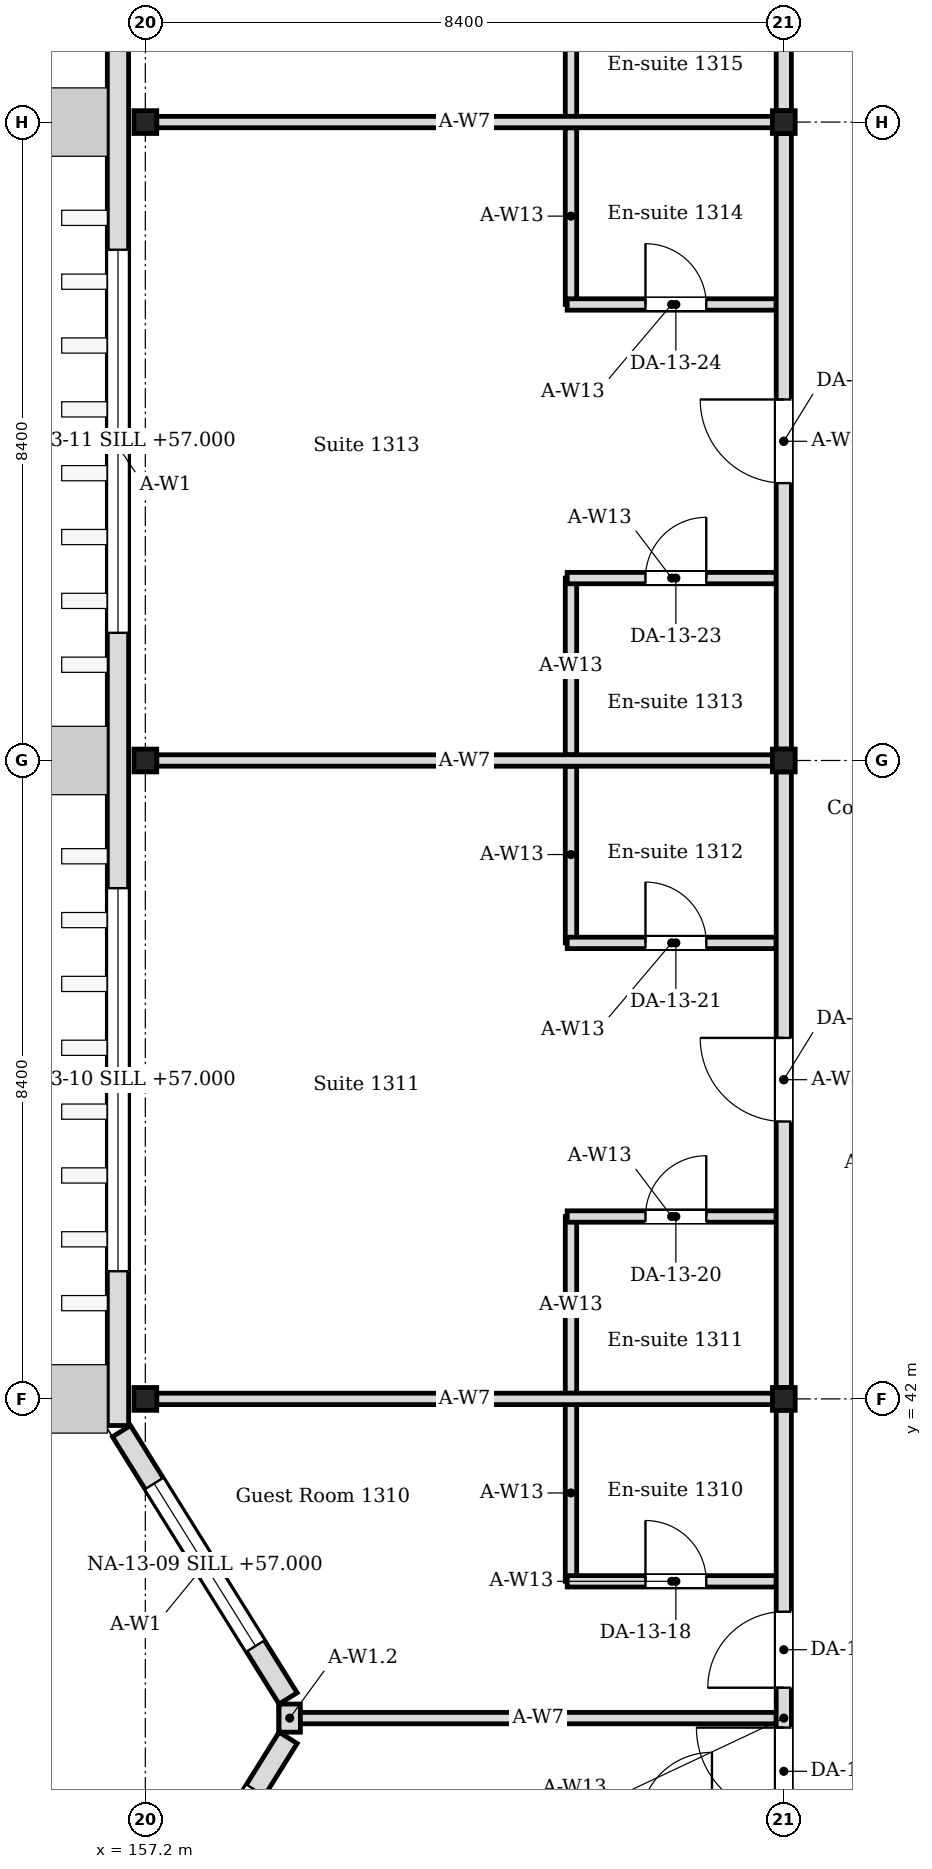
"""IFC4 building model, lengths in metres.
Left out: names, types, materials, properties, quantities, classifications, styles, units other than length and angle.
Written with IfcOpenShell. Run it as: python <this file> out.ifc"""

import sys

from ifc_helpers import new_model, si_unit, direction, frame, frame_2d, origin, origin_2d, place, context, subcontext, project, spatial, rectangle, i_section, extrude, element, fill, save


model = new_model("IFC4")
c1 = context("Model", 3, precision=1e-05, world=origin(), true_north=direction((0.0, 1.0)))
c2 = subcontext(c1, "Body", "Model", "MODEL_VIEW")
j1 = project(units=[si_unit("LENGTHUNIT", "METRE"), si_unit("PLANEANGLEUNIT", "RADIAN")], contexts=[c1])
p1 = place(None, origin())
s1 = spatial("IfcSite", under=j1, at=p1, CompositionType="ELEMENT")
p2 = place(p1, origin())
s2 = spatial("IfcBuilding", under=s1, at=p2, CompositionType="ELEMENT")
p3 = place(p2, frame((0.0, 0.0, 56.4)))
s3 = spatial("IfcBuildingStorey", under=s2, at=p3, CompositionType="ELEMENT", Elevation=56.4)
for number, where, z_axis, x_axis in (
    (1, (157.2, 42.0, 0.0), (0.0, 0.0, 1.0), (1.0, 0.0, 0.0)),
    (2, (157.2, 50.4, 0.0), (0.0, 0.0, 1.0), (1.0, 0.0, 0.0)),
    (3, (157.2, 58.8, 0.0), (0.0, 0.0, 1.0), (1.0, 0.0, 0.0)),
    (4, (165.6, 42.0, 0.0), (0.0, 0.0, 1.0), (1.0, 0.0, 0.0)),
    (5, (165.6, 50.4, 0.0), (0.0, 0.0, 1.0), (1.0, 0.0, 0.0)),
    (6, (165.6, 58.8, 0.0), (0.0, 0.0, 1.0), (1.0, 0.0, 0.0)),
):
    element("IfcColumn", number, at=place(p3, frame(where, z_axis=z_axis, x_axis=x_axis)), inside=s3, PredefinedType="COLUMN", context=c2, shape_type="SweptSolid", body=[
        extrude(i_section(OverallWidth=0.3, OverallDepth=0.3, WebThickness=0.01, FlangeThickness=0.015, FilletRadius=0.013, at=origin_2d()), origin(), (0.0, 0.0, 1.0), 4.2),
    ])
p4 = place(p3, frame((156.886, 34.024, 0.0), z_axis=(0.0, 0.0, 1.0), x_axis=(0.529018946142, 0.848610013271, 0.0)))
e7 = element("IfcWall", 7, at=p4, inside=s3, PredefinedType="SOLIDWALL", context=c2, shape_type="SweptSolid", body=[
    extrude(rectangle(XDim=4.144, YDim=0.28, at=frame_2d((2.072, 0.0))), origin(), (0.0, 0.0, 1.0), 4.05),
])
p5 = place(p4, frame((0.812, 0.0, 0.45)))
e8 = element("IfcOpeningElement", 8, at=p5, cuts=e7, PredefinedType="OPENING", context=c2, shape_type="SweptSolid", body=[
    extrude(rectangle(XDim=2.52, YDim=2.1, at=frame_2d((1.26, 1.05))), frame((0.0, 0.15, 0.0), z_axis=(0.0, -1.0, 0.0), x_axis=(1.0, 0.0, 0.0)), (0.0, 0.0, 1.0), 0.3),
])
p6 = place(p3, frame((159.079, 38.059, 0.0), z_axis=(0.0, 0.0, 1.0), x_axis=(-0.529018946142, 0.848610013271, 0.0)))
e9 = element("IfcWall", 9, at=p6, inside=s3, PredefinedType="SOLIDWALL", context=c2, shape_type="SweptSolid", body=[
    extrude(rectangle(XDim=4.144, YDim=0.28, at=frame_2d((2.072, 0.0))), origin(), (0.0, 0.0, 1.0), 4.05),
])
p7 = place(p6, frame((0.812, 0.0, 0.6)))
e10 = element("IfcOpeningElement", 10, at=p7, cuts=e9, PredefinedType="OPENING", context=c2, shape_type="SweptSolid", body=[
    extrude(rectangle(XDim=2.52, YDim=2.4, at=frame_2d((1.26, 1.2))), frame((0.0, 0.15, 0.0), z_axis=(0.0, -1.0, 0.0), x_axis=(1.0, 0.0, 0.0)), (0.0, 0.0, 1.0), 0.3),
])
p8 = place(p3, frame((159.1, 37.615, 0.0), z_axis=(0.0, 0.0, 1.0), x_axis=(0.0, 1.0, 0.0)))
e11 = element("IfcWall", 11, at=p8, inside=s3, PredefinedType="SOLIDWALL", context=c2, shape_type="SweptSolid", body=[
    extrude(rectangle(XDim=0.37, YDim=0.28, at=frame_2d((0.185, 0.0))), origin(), (0.0, 0.0, 1.0), 3.604),
])
p9 = place(p3, frame((156.84, 41.65, 0.0), z_axis=(0.0, 0.0, 1.0), x_axis=(0.0, 1.0, 0.0)))
e12 = element("IfcWall", 12, at=p9, inside=s3, PredefinedType="SOLIDWALL", context=c2, shape_type="SweptSolid", body=[
    extrude(rectangle(XDim=25.77, YDim=0.28, at=frame_2d((12.885, 0.0))), origin(), (0.0, 0.0, 1.0), 4.05),
])
p10 = place(p9, frame((2.03, 0.0, 0.6)))
e13 = element("IfcOpeningElement", 13, at=p10, cuts=e12, PredefinedType="OPENING", context=c2, shape_type="SweptSolid", body=[
    extrude(rectangle(XDim=5.04, YDim=2.4, at=frame_2d((2.52, 1.2))), frame((0.0, 0.15, 0.0), z_axis=(0.0, -1.0, 0.0), x_axis=(1.0, 0.0, 0.0)), (0.0, 0.0, 1.0), 0.3),
])
p11 = place(p9, frame((10.43, 0.0, 0.6)))
e14 = element("IfcOpeningElement", 14, at=p11, cuts=e12, PredefinedType="OPENING", context=c2, shape_type="SweptSolid", body=[
    extrude(rectangle(XDim=5.04, YDim=2.4, at=frame_2d((2.52, 1.2))), frame((0.0, 0.15, 0.0), z_axis=(0.0, -1.0, 0.0), x_axis=(1.0, 0.0, 0.0)), (0.0, 0.0, 1.0), 0.3),
])
p12 = place(p9, frame((18.83, 0.0, 0.6)))
e15 = element("IfcOpeningElement", 15, at=p12, cuts=e12, PredefinedType="OPENING", context=c2, shape_type="SweptSolid", body=[
    extrude(rectangle(XDim=5.04, YDim=2.4, at=frame_2d((2.52, 1.2))), frame((0.0, 0.15, 0.0), z_axis=(0.0, -1.0, 0.0), x_axis=(1.0, 0.0, 0.0)), (0.0, 0.0, 1.0), 0.3),
])
p13 = place(p3, frame((162.8, 39.6, 0.0), z_axis=(0.0, 0.0, 1.0), x_axis=(0.0, 1.0, 0.0)))
e16 = element("IfcWall", 16, at=p13, inside=s3, PredefinedType="PARTITIONING", context=c2, shape_type="SweptSolid", body=[
    extrude(rectangle(XDim=2.325, YDim=0.15, at=frame_2d((1.163, 0.0))), origin(), (0.0, 0.0, 1.0), 4.05),
])
p14 = place(p3, frame((162.75, 39.6, 0.0), z_axis=(0.0, 0.0, 1.0), x_axis=(1.0, 0.0, 0.0)))
e17 = element("IfcWall", 17, at=p14, inside=s3, PredefinedType="PARTITIONING", context=c2, shape_type="SweptSolid", body=[
    extrude(rectangle(XDim=2.75, YDim=0.15, at=frame_2d((1.375, 0.0))), origin(), (0.0, 0.0, 1.0), 4.05),
])
p15 = place(p14, frame((1.03, 0.0, 0.0)))
e18 = element("IfcOpeningElement", 18, at=p15, cuts=e17, PredefinedType="OPENING", context=c2, shape_type="SweptSolid", body=[
    extrude(rectangle(XDim=0.8, YDim=2.1, at=frame_2d((0.4, 1.05))), frame((0.0, 0.085, 0.0), z_axis=(0.0, -1.0, 0.0), x_axis=(1.0, 0.0, 0.0)), (0.0, 0.0, 1.0), 0.17),
])
p16 = place(p3, frame((162.8, 42.075, 0.0), z_axis=(0.0, 0.0, 1.0), x_axis=(0.0, 1.0, 0.0)))
e19 = element("IfcWall", 19, at=p16, inside=s3, PredefinedType="PARTITIONING", context=c2, shape_type="SweptSolid", body=[
    extrude(rectangle(XDim=2.325, YDim=0.15, at=frame_2d((1.163, 0.0))), origin(), (0.0, 0.0, 1.0), 4.05),
])
p17 = place(p3, frame((162.75, 44.4, 0.0), z_axis=(0.0, 0.0, 1.0), x_axis=(1.0, 0.0, 0.0)))
e20 = element("IfcWall", 20, at=p17, inside=s3, PredefinedType="PARTITIONING", context=c2, shape_type="SweptSolid", body=[
    extrude(rectangle(XDim=2.75, YDim=0.15, at=frame_2d((1.375, 0.0))), origin(), (0.0, 0.0, 1.0), 4.05),
])
p18 = place(p17, frame((1.03, 0.0, 0.0)))
e21 = element("IfcOpeningElement", 21, at=p18, cuts=e20, PredefinedType="OPENING", context=c2, shape_type="SweptSolid", body=[
    extrude(rectangle(XDim=0.8, YDim=2.1, at=frame_2d((0.4, 1.05))), frame((0.0, 0.085, 0.0), z_axis=(0.0, -1.0, 0.0), x_axis=(1.0, 0.0, 0.0)), (0.0, 0.0, 1.0), 0.17),
])
p19 = place(p3, frame((162.8, 48.0, 0.0), z_axis=(0.0, 0.0, 1.0), x_axis=(0.0, 1.0, 0.0)))
e22 = element("IfcWall", 22, at=p19, inside=s3, PredefinedType="PARTITIONING", context=c2, shape_type="SweptSolid", body=[
    extrude(rectangle(XDim=2.325, YDim=0.15, at=frame_2d((1.163, 0.0))), origin(), (0.0, 0.0, 1.0), 4.05),
])
p20 = place(p3, frame((162.75, 48.0, 0.0), z_axis=(0.0, 0.0, 1.0), x_axis=(1.0, 0.0, 0.0)))
e23 = element("IfcWall", 23, at=p20, inside=s3, PredefinedType="PARTITIONING", context=c2, shape_type="SweptSolid", body=[
    extrude(rectangle(XDim=2.75, YDim=0.15, at=frame_2d((1.375, 0.0))), origin(), (0.0, 0.0, 1.0), 4.05),
])
p21 = place(p20, frame((1.03, 0.0, 0.0)))
e24 = element("IfcOpeningElement", 24, at=p21, cuts=e23, PredefinedType="OPENING", context=c2, shape_type="SweptSolid", body=[
    extrude(rectangle(XDim=0.8, YDim=2.1, at=frame_2d((0.4, 1.05))), frame((0.0, 0.085, 0.0), z_axis=(0.0, -1.0, 0.0), x_axis=(1.0, 0.0, 0.0)), (0.0, 0.0, 1.0), 0.17),
])
p22 = place(p3, frame((162.8, 50.475, 0.0), z_axis=(0.0, 0.0, 1.0), x_axis=(0.0, 1.0, 0.0)))
e25 = element("IfcWall", 25, at=p22, inside=s3, PredefinedType="PARTITIONING", context=c2, shape_type="SweptSolid", body=[
    extrude(rectangle(XDim=2.325, YDim=0.15, at=frame_2d((1.163, 0.0))), origin(), (0.0, 0.0, 1.0), 4.05),
])
p23 = place(p3, frame((162.75, 52.8, 0.0), z_axis=(0.0, 0.0, 1.0), x_axis=(1.0, 0.0, 0.0)))
e26 = element("IfcWall", 26, at=p23, inside=s3, PredefinedType="PARTITIONING", context=c2, shape_type="SweptSolid", body=[
    extrude(rectangle(XDim=2.75, YDim=0.15, at=frame_2d((1.375, 0.0))), origin(), (0.0, 0.0, 1.0), 4.05),
])
p24 = place(p23, frame((1.03, 0.0, 0.0)))
e27 = element("IfcOpeningElement", 27, at=p24, cuts=e26, PredefinedType="OPENING", context=c2, shape_type="SweptSolid", body=[
    extrude(rectangle(XDim=0.8, YDim=2.1, at=frame_2d((0.4, 1.05))), frame((0.0, 0.085, 0.0), z_axis=(0.0, -1.0, 0.0), x_axis=(1.0, 0.0, 0.0)), (0.0, 0.0, 1.0), 0.17),
])
p25 = place(p3, frame((162.8, 56.4, 0.0), z_axis=(0.0, 0.0, 1.0), x_axis=(0.0, 1.0, 0.0)))
e28 = element("IfcWall", 28, at=p25, inside=s3, PredefinedType="PARTITIONING", context=c2, shape_type="SweptSolid", body=[
    extrude(rectangle(XDim=2.325, YDim=0.15, at=frame_2d((1.163, 0.0))), origin(), (0.0, 0.0, 1.0), 4.05),
])
p26 = place(p3, frame((162.75, 56.4, 0.0), z_axis=(0.0, 0.0, 1.0), x_axis=(1.0, 0.0, 0.0)))
e29 = element("IfcWall", 29, at=p26, inside=s3, PredefinedType="PARTITIONING", context=c2, shape_type="SweptSolid", body=[
    extrude(rectangle(XDim=2.75, YDim=0.15, at=frame_2d((1.375, 0.0))), origin(), (0.0, 0.0, 1.0), 4.05),
])
p27 = place(p26, frame((1.03, 0.0, 0.0)))
e30 = element("IfcOpeningElement", 30, at=p27, cuts=e29, PredefinedType="OPENING", context=c2, shape_type="SweptSolid", body=[
    extrude(rectangle(XDim=0.8, YDim=2.1, at=frame_2d((0.4, 1.05))), frame((0.0, 0.085, 0.0), z_axis=(0.0, -1.0, 0.0), x_axis=(1.0, 0.0, 0.0)), (0.0, 0.0, 1.0), 0.17),
])
p28 = place(p3, frame((162.8, 58.875, 0.0), z_axis=(0.0, 0.0, 1.0), x_axis=(0.0, 1.0, 0.0)))
e31 = element("IfcWall", 31, at=p28, inside=s3, PredefinedType="PARTITIONING", context=c2, shape_type="SweptSolid", body=[
    extrude(rectangle(XDim=2.325, YDim=0.15, at=frame_2d((1.163, 0.0))), origin(), (0.0, 0.0, 1.0), 4.05),
])
for number, where, z_axis, x_axis in (
    (32, (157.35, 42.0, 0.0), (0.0, 0.0, 1.0), (1.0, 0.0, 0.0)),
    (33, (157.35, 50.4, 0.0), (0.0, 0.0, 1.0), (1.0, 0.0, 0.0)),
    (34, (157.35, 58.8, 0.0), (0.0, 0.0, 1.0), (1.0, 0.0, 0.0)),
):
    element("IfcWall", number, at=place(p3, frame(where, z_axis=z_axis, x_axis=x_axis)), inside=s3, PredefinedType="PARTITIONING", context=c2, shape_type="SweptSolid", body=[
        extrude(rectangle(XDim=8.1, YDim=0.15, at=frame_2d((4.05, 0.0))), origin(), (0.0, 0.0, 1.0), 3.604),
    ])
p29 = place(p3, frame((159.24, 37.8, 0.0), z_axis=(0.0, 0.0, 1.0), x_axis=(1.0, 0.0, 0.0)))
e35 = element("IfcWall", 35, at=p29, inside=s3, PredefinedType="PARTITIONING", context=c2, shape_type="SweptSolid", body=[
    extrude(rectangle(XDim=6.26, YDim=0.15, at=frame_2d((3.13, 0.0))), origin(), (0.0, 0.0, 1.0), 3.604),
])
p30 = place(p3, frame((165.6, 33.75, 0.0), z_axis=(0.0, 0.0, 1.0), x_axis=(0.0, 1.0, 0.0)))
e36 = element("IfcWall", 36, at=p30, inside=s3, PredefinedType="PARTITIONING", context=c2, shape_type="SweptSolid", body=[
    extrude(rectangle(XDim=8.1, YDim=0.2, at=frame_2d((4.05, 0.0))), origin(), (0.0, 0.0, 1.0), 3.45),
])
p31 = place(p30, frame((2.775, 0.0, 0.0)))
e37 = element("IfcOpeningElement", 37, at=p31, cuts=e36, PredefinedType="OPENING", context=c2, shape_type="SweptSolid", body=[
    extrude(rectangle(XDim=1.15, YDim=2.1, at=frame_2d((0.575, 1.05))), frame((0.0, 0.11, 0.0), z_axis=(0.0, -1.0, 0.0), x_axis=(1.0, 0.0, 0.0)), (0.0, 0.0, 1.0), 0.22),
])
p32 = place(p30, frame((4.45, 0.0, 0.0)))
e38 = element("IfcOpeningElement", 38, at=p32, cuts=e36, PredefinedType="OPENING", context=c2, shape_type="SweptSolid", body=[
    extrude(rectangle(XDim=1.0, YDim=2.4, at=frame_2d((0.5, 1.2))), frame((0.0, 0.11, 0.0), z_axis=(0.0, -1.0, 0.0), x_axis=(1.0, 0.0, 0.0)), (0.0, 0.0, 1.0), 0.22),
])
p33 = place(p3, frame((165.6, 42.15, 0.0), z_axis=(0.0, 0.0, 1.0), x_axis=(0.0, 1.0, 0.0)))
e39 = element("IfcWall", 39, at=p33, inside=s3, PredefinedType="PARTITIONING", context=c2, shape_type="SweptSolid", body=[
    extrude(rectangle(XDim=8.1, YDim=0.2, at=frame_2d((4.05, 0.0))), origin(), (0.0, 0.0, 1.0), 3.45),
])
p34 = place(p33, frame((3.5, 0.0, 0.0)))
e40 = element("IfcOpeningElement", 40, at=p34, cuts=e39, PredefinedType="OPENING", context=c2, shape_type="SweptSolid", body=[
    extrude(rectangle(XDim=1.1, YDim=2.4, at=frame_2d((0.55, 1.2))), frame((0.0, 0.11, 0.0), z_axis=(0.0, -1.0, 0.0), x_axis=(1.0, 0.0, 0.0)), (0.0, 0.0, 1.0), 0.22),
])
p35 = place(p3, frame((165.6, 50.55, 0.0), z_axis=(0.0, 0.0, 1.0), x_axis=(0.0, 1.0, 0.0)))
e41 = element("IfcWall", 41, at=p35, inside=s3, PredefinedType="PARTITIONING", context=c2, shape_type="SweptSolid", body=[
    extrude(rectangle(XDim=8.1, YDim=0.2, at=frame_2d((4.05, 0.0))), origin(), (0.0, 0.0, 1.0), 3.45),
])
p36 = place(p35, frame((3.5, 0.0, 0.0)))
e42 = element("IfcOpeningElement", 42, at=p36, cuts=e41, PredefinedType="OPENING", context=c2, shape_type="SweptSolid", body=[
    extrude(rectangle(XDim=1.1, YDim=2.4, at=frame_2d((0.55, 1.2))), frame((0.0, 0.11, 0.0), z_axis=(0.0, -1.0, 0.0), x_axis=(1.0, 0.0, 0.0)), (0.0, 0.0, 1.0), 0.22),
])
p37 = place(p3, frame((165.6, 58.95, 0.0), z_axis=(0.0, 0.0, 1.0), x_axis=(0.0, 1.0, 0.0)))
e43 = element("IfcWall", 43, at=p37, inside=s3, PredefinedType="PARTITIONING", context=c2, shape_type="SweptSolid", body=[
    extrude(rectangle(XDim=8.1, YDim=0.2, at=frame_2d((4.05, 0.0))), origin(), (0.0, 0.0, 1.0), 3.45),
])
p38 = place(p37, frame((3.5, 0.0, 0.0)))
e44 = element("IfcOpeningElement", 44, at=p38, cuts=e43, PredefinedType="OPENING", context=c2, shape_type="SweptSolid", body=[
    extrude(rectangle(XDim=1.1, YDim=2.4, at=frame_2d((0.55, 1.2))), frame((0.0, 0.11, 0.0), z_axis=(0.0, -1.0, 0.0), x_axis=(1.0, 0.0, 0.0)), (0.0, 0.0, 1.0), 0.22),
])
p39 = place(p7, origin())
e45 = element("IfcWindow", 45, at=p39, inside=s3, PartitioningType="SINGLE_PANEL", PredefinedType="WINDOW", context=c2, shape_type="SweptSolid", body=[
    extrude(rectangle(XDim=2.52, YDim=2.4, at=frame_2d((1.26, 1.2))), frame((0.0, 0.03, 0.0), z_axis=(0.0, -1.0, 0.0), x_axis=(1.0, 0.0, 0.0)), (0.0, 0.0, 1.0), 0.06),
])
fill(e10, e45)
p40 = place(p10, origin())
e46 = element("IfcWindow", 46, at=p40, inside=s3, PartitioningType="SINGLE_PANEL", PredefinedType="WINDOW", context=c2, shape_type="SweptSolid", body=[
    extrude(rectangle(XDim=5.04, YDim=2.4, at=frame_2d((2.52, 1.2))), frame((0.0, 0.03, 0.0), z_axis=(0.0, -1.0, 0.0), x_axis=(1.0, 0.0, 0.0)), (0.0, 0.0, 1.0), 0.06),
])
fill(e13, e46)
p41 = place(p11, origin())
e47 = element("IfcWindow", 47, at=p41, inside=s3, PartitioningType="SINGLE_PANEL", PredefinedType="WINDOW", context=c2, shape_type="SweptSolid", body=[
    extrude(rectangle(XDim=5.04, YDim=2.4, at=frame_2d((2.52, 1.2))), frame((0.0, 0.03, 0.0), z_axis=(0.0, -1.0, 0.0), x_axis=(1.0, 0.0, 0.0)), (0.0, 0.0, 1.0), 0.06),
])
fill(e14, e47)
p42 = place(p31, origin())
e48 = element("IfcDoor", 48, at=p42, inside=s3, OperationType="SINGLE_SWING_RIGHT", PredefinedType="DOOR", context=c2, shape_type="SweptSolid", body=[
    extrude(rectangle(XDim=1.15, YDim=2.1, at=frame_2d((0.575, 1.05))), frame((0.0, 0.025, 0.0), z_axis=(0.0, -1.0, 0.0), x_axis=(1.0, 0.0, 0.0)), (0.0, 0.0, 1.0), 0.05),
])
fill(e37, e48)
p43 = place(p15, origin())
e49 = element("IfcDoor", 49, at=p43, inside=s3, OperationType="SINGLE_SWING_LEFT", PredefinedType="DOOR", context=c2, shape_type="SweptSolid", body=[
    extrude(rectangle(XDim=0.8, YDim=2.1, at=frame_2d((0.4, 1.05))), frame((0.0, 0.025, 0.0), z_axis=(0.0, -1.0, 0.0), x_axis=(1.0, 0.0, 0.0)), (0.0, 0.0, 1.0), 0.05),
])
fill(e18, e49)
p44 = place(p32, origin())
e50 = element("IfcDoor", 50, at=p44, inside=s3, OperationType="SINGLE_SWING_LEFT", PredefinedType="DOOR", context=c2, shape_type="SweptSolid", body=[
    extrude(rectangle(XDim=1.0, YDim=2.4, at=frame_2d((0.5, 1.2))), frame((0.0, 0.025, 0.0), z_axis=(0.0, -1.0, 0.0), x_axis=(1.0, 0.0, 0.0)), (0.0, 0.0, 1.0), 0.05),
])
fill(e38, e50)
p45 = place(p18, origin())
e51 = element("IfcDoor", 51, at=p45, inside=s3, OperationType="SINGLE_SWING_RIGHT", PredefinedType="DOOR", context=c2, shape_type="SweptSolid", body=[
    extrude(rectangle(XDim=0.8, YDim=2.1, at=frame_2d((0.4, 1.05))), frame((0.0, 0.025, 0.0), z_axis=(0.0, -1.0, 0.0), x_axis=(1.0, 0.0, 0.0)), (0.0, 0.0, 1.0), 0.05),
])
fill(e21, e51)
p46 = place(p21, origin())
e52 = element("IfcDoor", 52, at=p46, inside=s3, OperationType="SINGLE_SWING_LEFT", PredefinedType="DOOR", context=c2, shape_type="SweptSolid", body=[
    extrude(rectangle(XDim=0.8, YDim=2.1, at=frame_2d((0.4, 1.05))), frame((0.0, 0.025, 0.0), z_axis=(0.0, -1.0, 0.0), x_axis=(1.0, 0.0, 0.0)), (0.0, 0.0, 1.0), 0.05),
])
fill(e24, e52)
p47 = place(p34, origin())
e53 = element("IfcDoor", 53, at=p47, inside=s3, OperationType="SINGLE_SWING_RIGHT", PredefinedType="DOOR", context=c2, shape_type="SweptSolid", body=[
    extrude(rectangle(XDim=1.1, YDim=2.4, at=frame_2d((0.55, 1.2))), frame((0.0, 0.025, 0.0), z_axis=(0.0, -1.0, 0.0), x_axis=(1.0, 0.0, 0.0)), (0.0, 0.0, 1.0), 0.05),
])
fill(e40, e53)
p48 = place(p24, origin())
e54 = element("IfcDoor", 54, at=p48, inside=s3, OperationType="SINGLE_SWING_RIGHT", PredefinedType="DOOR", context=c2, shape_type="SweptSolid", body=[
    extrude(rectangle(XDim=0.8, YDim=2.1, at=frame_2d((0.4, 1.05))), frame((0.0, 0.025, 0.0), z_axis=(0.0, -1.0, 0.0), x_axis=(1.0, 0.0, 0.0)), (0.0, 0.0, 1.0), 0.05),
])
fill(e27, e54)
p49 = place(p27, origin())
e55 = element("IfcDoor", 55, at=p49, inside=s3, OperationType="SINGLE_SWING_LEFT", PredefinedType="DOOR", context=c2, shape_type="SweptSolid", body=[
    extrude(rectangle(XDim=0.8, YDim=2.1, at=frame_2d((0.4, 1.05))), frame((0.0, 0.025, 0.0), z_axis=(0.0, -1.0, 0.0), x_axis=(1.0, 0.0, 0.0)), (0.0, 0.0, 1.0), 0.05),
])
fill(e30, e55)
p50 = place(p36, origin())
e56 = element("IfcDoor", 56, at=p50, inside=s3, OperationType="SINGLE_SWING_RIGHT", PredefinedType="DOOR", context=c2, shape_type="SweptSolid", body=[
    extrude(rectangle(XDim=1.1, YDim=2.4, at=frame_2d((0.55, 1.2))), frame((0.0, 0.025, 0.0), z_axis=(0.0, -1.0, 0.0), x_axis=(1.0, 0.0, 0.0)), (0.0, 0.0, 1.0), 0.05),
])
fill(e42, e56)
save(model, sys.argv[1])
